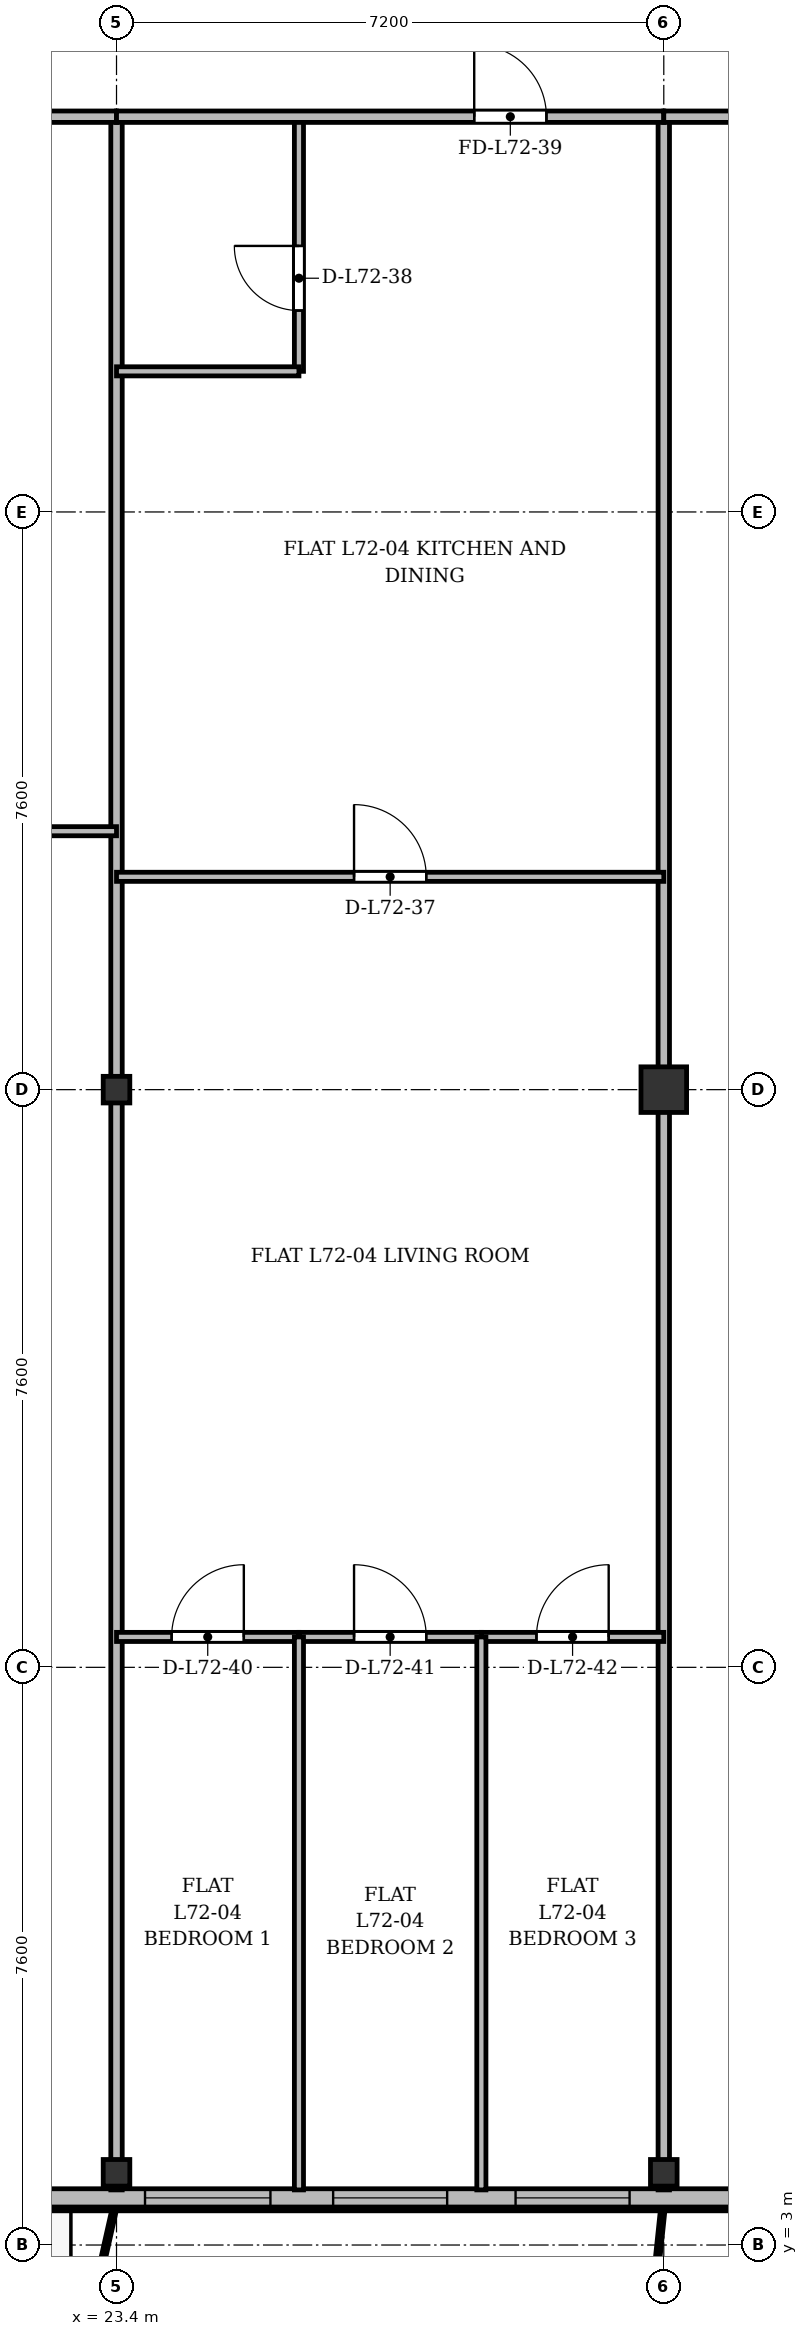
"""IFC4 building model, lengths in metres.
Left out: names, types, materials, properties, quantities, classifications, styles, units other than length and angle.
Written with IfcOpenShell. Run it as: python <this file> out.ifc"""

import sys

from ifc_helpers import new_model, si_unit, direction, frame, frame_2d, origin, origin_2d, place, context, subcontext, project, spatial, rectangle, i_section, extrude, source, transform, mapped, element, fill, save


model = new_model("IFC4")
c1 = context("Model", 3, precision=1e-05, world=origin(), true_north=direction((0.0, 1.0)))
c2 = subcontext(c1, "Body", "Model", "MODEL_VIEW")
j1 = project(units=[si_unit("LENGTHUNIT", "METRE"), si_unit("PLANEANGLEUNIT", "RADIAN")], contexts=[c1])
p1 = place(None, origin())
s1 = spatial("IfcSite", under=j1, at=p1, CompositionType="ELEMENT")
p2 = place(p1, origin())
s2 = spatial("IfcBuilding", under=s1, at=p2, CompositionType="ELEMENT")
p3 = place(p2, frame((0.0, 0.0, 277.5)))
s3 = spatial("IfcBuildingStorey", under=s2, at=p3, CompositionType="ELEMENT", Elevation=277.5)
m1 = source(origin(), c2, "Body", "SweptSolid", [
    extrude(i_section(OverallWidth=0.35, OverallDepth=0.35, WebThickness=0.018, FlangeThickness=0.028, at=origin_2d()), origin(), (0.0, 0.0, 1.0), 3.6),
])
for number, where, z_axis, x_axis in (
    (1, (23.4, 3.95, 0.0), (0.0, 0.0, 1.0), (1.0, 0.0, 0.0)),
    (2, (23.4, 18.2, 0.0), (0.0, 0.0, 1.0), (1.0, 0.0, 0.0)),
    (3, (30.6, 3.95, 0.0), (0.0, 0.0, 1.0), (1.0, 0.0, 0.0)),
):
    element("IfcColumn", number, at=place(p3, frame(where, z_axis=z_axis, x_axis=x_axis)), inside=s3, PredefinedType="COLUMN", context=c2, shape_type="MappedRepresentation", body=[
        mapped(m1, transform((0.0, 0.0, 0.0), x_axis=(1.0, 0.0, 0.0), y_axis=(0.0, 1.0, 0.0), z_axis=(0.0, 0.0, 1.0), scale=1.0)),
    ])
m2 = source(origin(), c2, "Body", "SweptSolid", [
    extrude(rectangle(XDim=0.6, YDim=0.6, at=origin_2d()), origin(), (0.0, 0.0, 1.0), 3.6),
])
p4 = place(p3, frame((30.6, 18.2, 0.0), z_axis=(0.0, 0.0, 1.0), x_axis=(1.0, 0.0, 0.0)))
e4 = element("IfcColumn", 4, at=p4, inside=s3, PredefinedType="COLUMN", context=c2, shape_type="MappedRepresentation", body=[
    mapped(m2, transform((0.0, 0.0, 0.0), x_axis=(1.0, 0.0, 0.0), y_axis=(0.0, 1.0, 0.0), z_axis=(0.0, 0.0, 1.0), scale=1.0)),
])
p5 = place(p3, frame((63.2, 3.62, 0.0), z_axis=(0.0, 0.0, 1.0), x_axis=(-1.0, 0.0, 0.0)))
e5 = element("IfcWall", 5, at=p5, inside=s3, PredefinedType="SOLIDWALL", context=c2, shape_type="SweptSolid", body=[
    extrude(rectangle(XDim=52.0, YDim=0.24, at=frame_2d((26.0, 0.0))), origin(), (0.0, 0.0, 1.0), 3.37),
])
p6 = place(p5, frame((1.495, 0.0, 0.9)))
e6 = element("IfcOpeningElement", 6, at=p6, cuts=e5, PredefinedType="OPENING", context=c2, shape_type="SweptSolid", body=[
    extrude(rectangle(XDim=1.5, YDim=1.75, at=frame_2d((0.75, 0.875))), frame((0.0, 0.13, 0.0), z_axis=(0.0, -1.0, 0.0), x_axis=(1.0, 0.0, 0.0)), (0.0, 0.0, 1.0), 0.26),
])
p7 = place(p5, frame((5.2, 0.0, 0.9)))
e7 = element("IfcOpeningElement", 7, at=p7, cuts=e5, PredefinedType="OPENING", context=c2, shape_type="SweptSolid", body=[
    extrude(rectangle(XDim=2.0, YDim=1.95, at=frame_2d((1.0, 0.975))), frame((0.0, 0.13, 0.0), z_axis=(0.0, -1.0, 0.0), x_axis=(1.0, 0.0, 0.0)), (0.0, 0.0, 1.0), 0.26),
])
p8 = place(p5, frame((9.275, 0.0, 0.9)))
e8 = element("IfcOpeningElement", 8, at=p8, cuts=e5, PredefinedType="OPENING", context=c2, shape_type="SweptSolid", body=[
    extrude(rectangle(XDim=1.65, YDim=1.85, at=frame_2d((0.825, 0.925))), frame((0.0, 0.13, 0.0), z_axis=(0.0, -1.0, 0.0), x_axis=(1.0, 0.0, 0.0)), (0.0, 0.0, 1.0), 0.26),
])
p9 = place(p5, frame((14.017, 0.0, 0.0)))
e9 = element("IfcOpeningElement", 9, at=p9, cuts=e5, PredefinedType="OPENING", context=c2, shape_type="SweptSolid", body=[
    extrude(rectangle(XDim=1.2, YDim=2.2, at=frame_2d((0.6, 1.1))), frame((0.0, 0.13, 0.0), z_axis=(0.0, -1.0, 0.0), x_axis=(1.0, 0.0, 0.0)), (0.0, 0.0, 1.0), 0.26),
])
p10 = place(p5, frame((24.9, 0.0, 0.9)))
e10 = element("IfcOpeningElement", 10, at=p10, cuts=e5, PredefinedType="OPENING", context=c2, shape_type="SweptSolid", body=[
    extrude(rectangle(XDim=2.2, YDim=1.8, at=frame_2d((1.1, 0.9))), frame((0.0, 0.13, 0.0), z_axis=(0.0, -1.0, 0.0), x_axis=(1.0, 0.0, 0.0)), (0.0, 0.0, 1.0), 0.26),
])
p11 = place(p5, frame((33.05, 0.0, 0.9)))
e11 = element("IfcOpeningElement", 11, at=p11, cuts=e5, PredefinedType="OPENING", context=c2, shape_type="SweptSolid", body=[
    extrude(rectangle(XDim=1.5, YDim=1.75, at=frame_2d((0.75, 0.875))), frame((0.0, 0.13, 0.0), z_axis=(0.0, -1.0, 0.0), x_axis=(1.0, 0.0, 0.0)), (0.0, 0.0, 1.0), 0.26),
])
p12 = place(p5, frame((35.45, 0.0, 0.9)))
e12 = element("IfcOpeningElement", 12, at=p12, cuts=e5, PredefinedType="OPENING", context=c2, shape_type="SweptSolid", body=[
    extrude(rectangle(XDim=1.5, YDim=1.75, at=frame_2d((0.75, 0.875))), frame((0.0, 0.13, 0.0), z_axis=(0.0, -1.0, 0.0), x_axis=(1.0, 0.0, 0.0)), (0.0, 0.0, 1.0), 0.26),
])
p13 = place(p5, frame((37.775, 0.0, 0.9)))
e13 = element("IfcOpeningElement", 13, at=p13, cuts=e5, PredefinedType="OPENING", context=c2, shape_type="SweptSolid", body=[
    extrude(rectangle(XDim=1.65, YDim=1.85, at=frame_2d((0.825, 0.925))), frame((0.0, 0.13, 0.0), z_axis=(0.0, -1.0, 0.0), x_axis=(1.0, 0.0, 0.0)), (0.0, 0.0, 1.0), 0.26),
])
p14 = place(p5, frame((41.452, 0.0, 0.0)))
e14 = element("IfcOpeningElement", 14, at=p14, cuts=e5, PredefinedType="OPENING", context=c2, shape_type="SweptSolid", body=[
    extrude(rectangle(XDim=1.2, YDim=2.2, at=frame_2d((0.6, 1.1))), frame((0.0, 0.13, 0.0), z_axis=(0.0, -1.0, 0.0), x_axis=(1.0, 0.0, 0.0)), (0.0, 0.0, 1.0), 0.26),
])
p15 = place(p5, frame((44.3, 0.0, 0.9)))
e15 = element("IfcOpeningElement", 15, at=p15, cuts=e5, PredefinedType="OPENING", context=c2, shape_type="SweptSolid", body=[
    extrude(rectangle(XDim=2.2, YDim=1.8, at=frame_2d((1.1, 0.9))), frame((0.0, 0.13, 0.0), z_axis=(0.0, -1.0, 0.0), x_axis=(1.0, 0.0, 0.0)), (0.0, 0.0, 1.0), 0.26),
])
p16 = place(p5, frame((49.005, 0.0, 0.9)))
e16 = element("IfcOpeningElement", 16, at=p16, cuts=e5, PredefinedType="OPENING", context=c2, shape_type="SweptSolid", body=[
    extrude(rectangle(XDim=1.5, YDim=1.75, at=frame_2d((0.75, 0.875))), frame((0.0, 0.13, 0.0), z_axis=(0.0, -1.0, 0.0), x_axis=(1.0, 0.0, 0.0)), (0.0, 0.0, 1.0), 0.26),
])
for number, where, z_axis, x_axis in (
    (17, (23.4, 3.725, 0.0), (0.0, 0.0, 1.0), (0.0, 1.0, 0.0)),
    (18, (30.6, 3.725, 0.0), (0.0, 0.0, 1.0), (0.0, 1.0, 0.0)),
):
    element("IfcWall", number, at=place(p3, frame(where, z_axis=z_axis, x_axis=x_axis)), inside=s3, PredefinedType="PARTITIONING", context=c2, shape_type="SweptSolid", body=[
        extrude(rectangle(XDim=27.275, YDim=0.15, at=frame_2d((13.637, 0.0))), origin(), (0.0, 0.0, 1.0), 2.87),
    ])
p17 = place(p3, frame((20.0, 31.0, 0.0), z_axis=(0.0, 0.0, 1.0), x_axis=(1.0, 0.0, 0.0)))
e19 = element("IfcWall", 19, at=p17, inside=s3, PredefinedType="PARTITIONING", context=c2, shape_type="SweptSolid", body=[
    extrude(rectangle(XDim=3.4, YDim=0.15, at=frame_2d((1.7, 0.0))), origin(), (0.0, 0.0, 1.0), 2.87),
])
p18 = place(p17, frame((1.131, 0.0, 0.0)))
e20 = element("IfcOpeningElement", 20, at=p18, cuts=e19, PredefinedType="OPENING", context=c2, shape_type="SweptSolid", body=[
    extrude(rectangle(XDim=0.95, YDim=2.15, at=frame_2d((0.475, 1.075))), frame((0.0, 0.085, 0.0), z_axis=(0.0, -1.0, 0.0), x_axis=(1.0, 0.0, 0.0)), (0.0, 0.0, 1.0), 0.17),
])
p19 = place(p3, frame((20.0, 21.6, 0.0), z_axis=(0.0, 0.0, 1.0), x_axis=(1.0, 0.0, 0.0)))
e21 = element("IfcWall", 21, at=p19, inside=s3, PredefinedType="PARTITIONING", context=c2, shape_type="SweptSolid", body=[
    extrude(rectangle(XDim=3.4, YDim=0.12, at=frame_2d((1.7, 0.0))), origin(), (0.0, 0.0, 1.0), 2.87),
])
p20 = place(p19, frame((1.131, 0.0, 0.0)))
e22 = element("IfcOpeningElement", 22, at=p20, cuts=e21, PredefinedType="OPENING", context=c2, shape_type="SweptSolid", body=[
    extrude(rectangle(XDim=0.95, YDim=2.15, at=frame_2d((0.475, 1.075))), frame((0.0, 0.07, 0.0), z_axis=(0.0, -1.0, 0.0), x_axis=(1.0, 0.0, 0.0)), (0.0, 0.0, 1.0), 0.14),
])
p21 = place(p3, frame((23.4, 21.0, 0.0), z_axis=(0.0, 0.0, 1.0), x_axis=(1.0, 0.0, 0.0)))
e23 = element("IfcWall", 23, at=p21, inside=s3, PredefinedType="PARTITIONING", context=c2, shape_type="SweptSolid", body=[
    extrude(rectangle(XDim=7.2, YDim=0.12, at=frame_2d((3.6, 0.0))), origin(), (0.0, 0.0, 1.0), 2.87),
])
p22 = place(p21, frame((3.125, 0.0, 0.0)))
e24 = element("IfcOpeningElement", 24, at=p22, cuts=e23, PredefinedType="OPENING", context=c2, shape_type="SweptSolid", body=[
    extrude(rectangle(XDim=0.95, YDim=2.15, at=frame_2d((0.475, 1.075))), frame((0.0, 0.07, 0.0), z_axis=(0.0, -1.0, 0.0), x_axis=(1.0, 0.0, 0.0)), (0.0, 0.0, 1.0), 0.14),
])
p23 = place(p3, frame((25.8, 27.65, 0.0), z_axis=(0.0, 0.0, 1.0), x_axis=(0.0, 1.0, 0.0)))
e25 = element("IfcWall", 25, at=p23, inside=s3, PredefinedType="PARTITIONING", context=c2, shape_type="SweptSolid", body=[
    extrude(rectangle(XDim=3.35, YDim=0.12, at=frame_2d((1.675, 0.0))), origin(), (0.0, 0.0, 1.0), 3.37),
])
p24 = place(p23, frame((0.8, 0.0, 0.0)))
e26 = element("IfcOpeningElement", 26, at=p24, cuts=e25, PredefinedType="OPENING", context=c2, shape_type="SweptSolid", body=[
    extrude(rectangle(XDim=0.85, YDim=2.1, at=frame_2d((0.425, 1.05))), frame((0.0, 0.07, 0.0), z_axis=(0.0, -1.0, 0.0), x_axis=(1.0, 0.0, 0.0)), (0.0, 0.0, 1.0), 0.14),
])
p25 = place(p3, frame((23.4, 27.65, 0.0), z_axis=(0.0, 0.0, 1.0), x_axis=(1.0, 0.0, 0.0)))
e27 = element("IfcWall", 27, at=p25, inside=s3, PredefinedType="PARTITIONING", context=c2, shape_type="SweptSolid", body=[
    extrude(rectangle(XDim=2.4, YDim=0.12, at=frame_2d((1.2, 0.0))), origin(), (0.0, 0.0, 1.0), 2.87),
])
p26 = place(p3, frame((23.4, 31.0, 0.0), z_axis=(0.0, 0.0, 1.0), x_axis=(1.0, 0.0, 0.0)))
e28 = element("IfcWall", 28, at=p26, inside=s3, PredefinedType="PARTITIONING", context=c2, shape_type="SweptSolid", body=[
    extrude(rectangle(XDim=7.2, YDim=0.15, at=frame_2d((3.6, 0.0))), origin(), (0.0, 0.0, 1.0), 2.87),
])
p27 = place(p26, frame((4.706, 0.0, 0.0)))
e29 = element("IfcOpeningElement", 29, at=p27, cuts=e28, PredefinedType="OPENING", context=c2, shape_type="SweptSolid", body=[
    extrude(rectangle(XDim=0.95, YDim=2.15, at=frame_2d((0.475, 1.075))), frame((0.0, 0.085, 0.0), z_axis=(0.0, -1.0, 0.0), x_axis=(1.0, 0.0, 0.0)), (0.0, 0.0, 1.0), 0.17),
])
p28 = place(p3, frame((23.4, 11.0, 0.0), z_axis=(0.0, 0.0, 1.0), x_axis=(1.0, 0.0, 0.0)))
e30 = element("IfcWall", 30, at=p28, inside=s3, PredefinedType="PARTITIONING", context=c2, shape_type="SweptSolid", body=[
    extrude(rectangle(XDim=2.4, YDim=0.12, at=frame_2d((1.2, 0.0))), origin(), (0.0, 0.0, 1.0), 2.87),
])
p29 = place(p28, frame((0.725, 0.0, 0.0)))
e31 = element("IfcOpeningElement", 31, at=p29, cuts=e30, PredefinedType="OPENING", context=c2, shape_type="SweptSolid", body=[
    extrude(rectangle(XDim=0.95, YDim=2.15, at=frame_2d((0.475, 1.075))), frame((0.0, 0.07, 0.0), z_axis=(0.0, -1.0, 0.0), x_axis=(1.0, 0.0, 0.0)), (0.0, 0.0, 1.0), 0.14),
])
p30 = place(p3, frame((25.8, 11.0, 0.0), z_axis=(0.0, 0.0, 1.0), x_axis=(1.0, 0.0, 0.0)))
e32 = element("IfcWall", 32, at=p30, inside=s3, PredefinedType="PARTITIONING", context=c2, shape_type="SweptSolid", body=[
    extrude(rectangle(XDim=2.4, YDim=0.12, at=frame_2d((1.2, 0.0))), origin(), (0.0, 0.0, 1.0), 3.07),
])
p31 = place(p30, frame((0.725, 0.0, 0.0)))
e33 = element("IfcOpeningElement", 33, at=p31, cuts=e32, PredefinedType="OPENING", context=c2, shape_type="SweptSolid", body=[
    extrude(rectangle(XDim=0.95, YDim=2.15, at=frame_2d((0.475, 1.075))), frame((0.0, 0.07, 0.0), z_axis=(0.0, -1.0, 0.0), x_axis=(1.0, 0.0, 0.0)), (0.0, 0.0, 1.0), 0.14),
])
p32 = place(p3, frame((25.8, 3.725, 0.0), z_axis=(0.0, 0.0, 1.0), x_axis=(0.0, 1.0, 0.0)))
e34 = element("IfcWall", 34, at=p32, inside=s3, PredefinedType="PARTITIONING", context=c2, shape_type="SweptSolid", body=[
    extrude(rectangle(XDim=7.275, YDim=0.12, at=frame_2d((3.637, 0.0))), origin(), (0.0, 0.0, 1.0), 2.92),
])
p33 = place(p3, frame((28.2, 11.0, 0.0), z_axis=(0.0, 0.0, 1.0), x_axis=(1.0, 0.0, 0.0)))
e35 = element("IfcWall", 35, at=p33, inside=s3, PredefinedType="PARTITIONING", context=c2, shape_type="SweptSolid", body=[
    extrude(rectangle(XDim=2.4, YDim=0.12, at=frame_2d((1.2, 0.0))), origin(), (0.0, 0.0, 1.0), 2.87),
])
p34 = place(p33, frame((0.725, 0.0, 0.0)))
e36 = element("IfcOpeningElement", 36, at=p34, cuts=e35, PredefinedType="OPENING", context=c2, shape_type="SweptSolid", body=[
    extrude(rectangle(XDim=0.95, YDim=2.15, at=frame_2d((0.475, 1.075))), frame((0.0, 0.07, 0.0), z_axis=(0.0, -1.0, 0.0), x_axis=(1.0, 0.0, 0.0)), (0.0, 0.0, 1.0), 0.14),
])
p35 = place(p3, frame((28.2, 3.725, 0.0), z_axis=(0.0, 0.0, 1.0), x_axis=(0.0, 1.0, 0.0)))
e37 = element("IfcWall", 37, at=p35, inside=s3, PredefinedType="PARTITIONING", context=c2, shape_type="SweptSolid", body=[
    extrude(rectangle(XDim=7.275, YDim=0.12, at=frame_2d((3.637, 0.0))), origin(), (0.0, 0.0, 1.0), 2.92),
])
p36 = place(p3, frame((30.6, 31.0, 0.0), z_axis=(0.0, 0.0, 1.0), x_axis=(1.0, 0.0, 0.0)))
e38 = element("IfcWall", 38, at=p36, inside=s3, PredefinedType="PARTITIONING", context=c2, shape_type="SweptSolid", body=[
    extrude(rectangle(XDim=13.2, YDim=0.15, at=frame_2d((6.6, 0.0))), origin(), (0.0, 0.0, 1.0), 2.87),
])
p37 = place(p36, frame((5.8, 0.0, 0.0)))
e39 = element("IfcOpeningElement", 39, at=p37, cuts=e38, PredefinedType="OPENING", context=c2, shape_type="SweptSolid", body=[
    extrude(rectangle(XDim=1.6, YDim=2.2, at=frame_2d((0.8, 1.1))), frame((0.0, 0.085, 0.0), z_axis=(0.0, -1.0, 0.0), x_axis=(1.0, 0.0, 0.0)), (0.0, 0.0, 1.0), 0.17),
])
m3 = source(origin(), c2, "Body", "SweptSolid", [
    extrude(rectangle(XDim=1.5, YDim=1.75, at=frame_2d((0.75, 0.875))), frame((0.0, 0.03, 0.0), z_axis=(0.0, -1.0, 0.0), x_axis=(1.0, 0.0, 0.0)), (0.0, 0.0, 1.0), 0.06),
])
p38 = place(p11, origin())
e40 = element("IfcWindow", 40, at=p38, inside=s3, PartitioningType="SINGLE_PANEL", PredefinedType="WINDOW", context=c2, shape_type="MappedRepresentation", body=[
    mapped(m3, transform((0.0, 0.0, 0.0), x_axis=(1.0, 0.0, 0.0), y_axis=(0.0, 1.0, 0.0), z_axis=(0.0, 0.0, 1.0), scale=1.0)),
])
fill(e11, e40)
p39 = place(p12, origin())
e41 = element("IfcWindow", 41, at=p39, inside=s3, PartitioningType="SINGLE_PANEL", PredefinedType="WINDOW", context=c2, shape_type="MappedRepresentation", body=[
    mapped(m3, transform((0.0, 0.0, 0.0), x_axis=(1.0, 0.0, 0.0), y_axis=(0.0, 1.0, 0.0), z_axis=(0.0, 0.0, 1.0), scale=1.0)),
])
fill(e12, e41)
m4 = source(origin(), c2, "Body", "SweptSolid", [
    extrude(rectangle(XDim=1.65, YDim=1.85, at=frame_2d((0.825, 0.925))), frame((0.0, 0.03, 0.0), z_axis=(0.0, -1.0, 0.0), x_axis=(1.0, 0.0, 0.0)), (0.0, 0.0, 1.0), 0.06),
])
p40 = place(p13, origin())
e42 = element("IfcWindow", 42, at=p40, inside=s3, PartitioningType="SINGLE_PANEL", PredefinedType="WINDOW", context=c2, shape_type="MappedRepresentation", body=[
    mapped(m4, transform((0.0, 0.0, 0.0), x_axis=(1.0, 0.0, 0.0), y_axis=(0.0, 1.0, 0.0), z_axis=(0.0, 0.0, 1.0), scale=1.0)),
])
fill(e13, e42)
m5 = source(origin(), c2, "Body", "SweptSolid", [
    extrude(rectangle(XDim=0.95, YDim=2.15, at=frame_2d((0.475, 1.075))), frame((0.0, 0.025, 0.0), z_axis=(0.0, -1.0, 0.0), x_axis=(1.0, 0.0, 0.0)), (0.0, 0.0, 1.0), 0.05),
])
p41 = place(p22, origin())
e43 = element("IfcDoor", 43, at=p41, inside=s3, OperationType="SINGLE_SWING_LEFT", PredefinedType="DOOR", context=c2, shape_type="MappedRepresentation", body=[
    mapped(m5, transform((0.0, 0.0, 0.0), x_axis=(1.0, 0.0, 0.0), y_axis=(0.0, 1.0, 0.0), z_axis=(0.0, 0.0, 1.0), scale=1.0)),
])
fill(e24, e43)
m6 = source(origin(), c2, "Body", "SweptSolid", [
    extrude(rectangle(XDim=0.85, YDim=2.1, at=frame_2d((0.425, 1.05))), frame((0.0, 0.025, 0.0), z_axis=(0.0, -1.0, 0.0), x_axis=(1.0, 0.0, 0.0)), (0.0, 0.0, 1.0), 0.05),
])
p42 = place(p24, origin())
e44 = element("IfcDoor", 44, at=p42, inside=s3, OperationType="SINGLE_SWING_RIGHT", PredefinedType="DOOR", context=c2, shape_type="MappedRepresentation", body=[
    mapped(m6, transform((0.0, 0.0, 0.0), x_axis=(1.0, 0.0, 0.0), y_axis=(0.0, 1.0, 0.0), z_axis=(0.0, 0.0, 1.0), scale=1.0)),
])
fill(e26, e44)
p43 = place(p27, origin())
e45 = element("IfcDoor", 45, at=p43, inside=s3, OperationType="SINGLE_SWING_LEFT", PredefinedType="DOOR", context=c2, shape_type="MappedRepresentation", body=[
    mapped(m5, transform((0.0, 0.0, 0.0), x_axis=(1.0, 0.0, 0.0), y_axis=(0.0, 1.0, 0.0), z_axis=(0.0, 0.0, 1.0), scale=1.0)),
])
fill(e29, e45)
p44 = place(p29, origin())
e46 = element("IfcDoor", 46, at=p44, inside=s3, OperationType="SINGLE_SWING_RIGHT", PredefinedType="DOOR", context=c2, shape_type="MappedRepresentation", body=[
    mapped(m5, transform((0.0, 0.0, 0.0), x_axis=(1.0, 0.0, 0.0), y_axis=(0.0, 1.0, 0.0), z_axis=(0.0, 0.0, 1.0), scale=1.0)),
])
fill(e31, e46)
p45 = place(p31, origin())
e47 = element("IfcDoor", 47, at=p45, inside=s3, OperationType="SINGLE_SWING_LEFT", PredefinedType="DOOR", context=c2, shape_type="MappedRepresentation", body=[
    mapped(m5, transform((0.0, 0.0, 0.0), x_axis=(1.0, 0.0, 0.0), y_axis=(0.0, 1.0, 0.0), z_axis=(0.0, 0.0, 1.0), scale=1.0)),
])
fill(e33, e47)
p46 = place(p34, origin())
e48 = element("IfcDoor", 48, at=p46, inside=s3, OperationType="SINGLE_SWING_RIGHT", PredefinedType="DOOR", context=c2, shape_type="MappedRepresentation", body=[
    mapped(m5, transform((0.0, 0.0, 0.0), x_axis=(1.0, 0.0, 0.0), y_axis=(0.0, 1.0, 0.0), z_axis=(0.0, 0.0, 1.0), scale=1.0)),
])
fill(e36, e48)
save(model, sys.argv[1])
